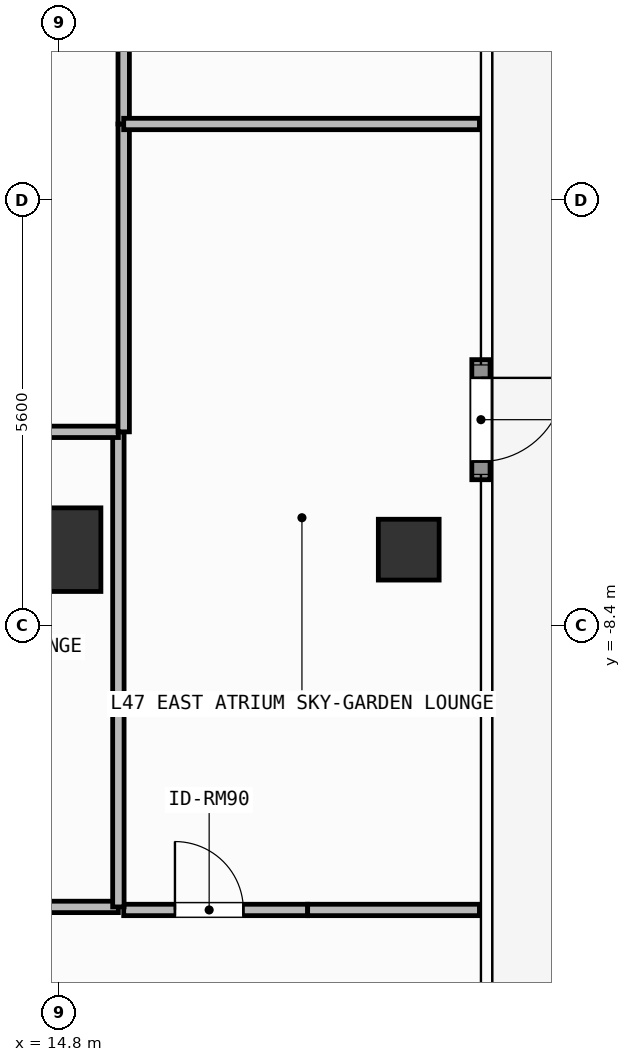
"""IFC4 building model, lengths in metres.
Left out: names, types, materials, properties, quantities, classifications, styles, units other than length and angle.
Written with IfcOpenShell. Run it as: python <this file> out.ifc"""

import sys

from ifc_helpers import new_model, si_unit, direction, frame, frame_2d, origin, origin_2d, place, context, subcontext, project, spatial, rectangle, hollow_rectangle, extrude, element, fill, save


model = new_model("IFC4")
c1 = context("Model", 3, precision=1e-05, world=origin(), true_north=direction((0.0, 1.0)))
c2 = subcontext(c1, "Body", "Model", "MODEL_VIEW")
j1 = project(units=[si_unit("LENGTHUNIT", "METRE"), si_unit("PLANEANGLEUNIT", "RADIAN")], contexts=[c1])
p1 = place(None, origin())
s1 = spatial("IfcSite", under=j1, at=p1, CompositionType="ELEMENT")
p2 = place(p1, origin())
s2 = spatial("IfcBuilding", under=s1, at=p2, CompositionType="ELEMENT")
p3 = place(p2, frame((0.0, 0.0, 191.4)))
s3 = spatial("IfcBuildingStorey", under=s2, at=p3, CompositionType="ELEMENT", Elevation=191.4)
p4 = place(p3, frame((14.8, -7.4, 0.0), z_axis=(0.0, 0.0, 1.0), x_axis=(1.0, 0.0, 0.0)))
e1 = element("IfcColumn", 1, at=p4, inside=s3, PredefinedType="COLUMN", context=c2, shape_type="SweptSolid", body=[
    extrude(rectangle(XDim=1.1, YDim=1.1, at=origin_2d()), origin(), (0.0, 0.0, 1.0), 3.9),
])
p5 = place(p3, frame((19.4, -7.4, 0.0), z_axis=(0.0, 0.0, 1.0), x_axis=(1.0, 0.0, 0.0)))
e2 = element("IfcColumn", 2, at=p5, inside=s3, PredefinedType="COLUMN", context=c2, shape_type="SweptSolid", body=[
    extrude(hollow_rectangle(XDim=0.8, YDim=0.8, WallThickness=0.036, at=origin_2d()), origin(), (0.0, 0.0, 1.0), 3.9),
])
p6 = place(p3, frame((20.35, -4.9, 0.0), z_axis=(0.0, 0.0, 1.0), x_axis=(0.0, -1.0, 0.0)))
e3 = element("IfcWall", 3, at=p6, inside=s3, PredefinedType="SOLIDWALL", context=c2, shape_type="SweptSolid", body=[
    extrude(rectangle(XDim=1.58, YDim=0.24, at=frame_2d((0.79, 0.0))), origin(), (0.0, 0.0, 1.0), 3.68),
])
p7 = place(p6, frame((0.24, 0.0, 0.0)))
e4 = element("IfcOpeningElement", 4, at=p7, cuts=e3, PredefinedType="OPENING", context=c2, shape_type="SweptSolid", body=[
    extrude(rectangle(XDim=1.1, YDim=2.2, at=frame_2d((0.55, 1.1))), frame((0.0, 0.13, 0.0), z_axis=(0.0, -1.0, 0.0), x_axis=(1.0, 0.0, 0.0)), (0.0, 0.0, 1.0), 0.26),
])
p8 = place(p3, frame((10.1, -12.1, 0.0), z_axis=(0.0, 0.0, 1.0), x_axis=(1.0, 0.0, 0.0)))
e5 = element("IfcWall", 5, at=p8, inside=s3, PredefinedType="PARTITIONING", context=c2, shape_type="SweptSolid", body=[
    extrude(rectangle(XDim=5.48, YDim=0.15, at=frame_2d((2.74, 0.0))), origin(), (0.0, 0.0, 1.0), 3.68),
])
p9 = place(p8, frame((2.29, 0.0, 0.0)))
e6 = element("IfcOpeningElement", 6, at=p9, cuts=e5, PredefinedType="OPENING", context=c2, shape_type="SweptSolid", body=[
    extrude(rectangle(XDim=0.9, YDim=2.1, at=frame_2d((0.45, 1.05))), frame((0.0, 0.085, 0.0), z_axis=(0.0, -1.0, 0.0), x_axis=(1.0, 0.0, 0.0)), (0.0, 0.0, 1.0), 0.17),
])
p10 = place(p3, frame((15.65, -12.14, 0.0), z_axis=(0.0, 0.0, 1.0), x_axis=(1.0, 0.0, 0.0)))
e7 = element("IfcWall", 7, at=p10, inside=s3, PredefinedType="PARTITIONING", context=c2, shape_type="SweptSolid", body=[
    extrude(rectangle(XDim=2.42, YDim=0.15, at=frame_2d((1.21, 0.0))), origin(), (0.0, 0.0, 1.0), 3.68),
])
p11 = place(p10, frame((0.674, 0.0, 0.0)))
e8 = element("IfcOpeningElement", 8, at=p11, cuts=e7, PredefinedType="OPENING", context=c2, shape_type="SweptSolid", body=[
    extrude(rectangle(XDim=0.9, YDim=2.1, at=frame_2d((0.45, 1.05))), frame((0.0, 0.085, 0.0), z_axis=(0.0, -1.0, 0.0), x_axis=(1.0, 0.0, 0.0)), (0.0, 0.0, 1.0), 0.17),
])
p12 = place(p3, frame((15.58, -12.1, 0.0), z_axis=(0.0, 0.0, 1.0), x_axis=(0.0, 1.0, 0.0)))
e9 = element("IfcWall", 9, at=p12, inside=s3, PredefinedType="PARTITIONING", context=c2, shape_type="SweptSolid", body=[
    extrude(rectangle(XDim=6.25, YDim=0.15, at=frame_2d((3.125, 0.0))), origin(), (0.0, 0.0, 1.0), 3.68),
])
p13 = place(p3, frame((8.96, -5.85, 0.0), z_axis=(0.0, 0.0, 1.0), x_axis=(1.0, 0.0, 0.0)))
e10 = element("IfcWall", 10, at=p13, inside=s3, PredefinedType="PARTITIONING", context=c2, shape_type="SweptSolid", body=[
    extrude(rectangle(XDim=6.62, YDim=0.15, at=frame_2d((3.31, 0.0))), origin(), (0.0, 0.0, 1.0), 3.68),
])
p14 = place(p3, frame((15.65, -5.85, 0.0), z_axis=(0.0, 0.0, 1.0), x_axis=(0.0, 1.0, 0.0)))
e11 = element("IfcWall", 11, at=p14, inside=s3, PredefinedType="PARTITIONING", context=c2, shape_type="SweptSolid", body=[
    extrude(rectangle(XDim=4.05, YDim=0.15, at=frame_2d((2.025, 0.0))), origin(), (0.0, 0.0, 1.0), 3.68),
])
p15 = place(p3, frame((15.65, -1.8, 0.0), z_axis=(0.0, 0.0, 1.0), x_axis=(0.0, 1.0, 0.0)))
e12 = element("IfcWall", 12, at=p15, inside=s3, PredefinedType="PARTITIONING", context=c2, shape_type="SweptSolid", body=[
    extrude(rectangle(XDim=7.65, YDim=0.15, at=frame_2d((3.825, 0.0))), origin(), (0.0, 0.0, 1.0), 3.68),
])
p16 = place(p3, frame((15.65, -1.8, 0.0), z_axis=(0.0, 0.0, 1.0), x_axis=(1.0, 0.0, 0.0)))
e13 = element("IfcWall", 13, at=p16, inside=s3, PredefinedType="PARTITIONING", context=c2, shape_type="SweptSolid", body=[
    extrude(rectangle(XDim=4.68, YDim=0.15, at=frame_2d((2.34, 0.0))), origin(), (0.0, 0.0, 1.0), 3.68),
])
p17 = place(p3, frame((18.07, -12.14, 0.0), z_axis=(0.0, 0.0, 1.0), x_axis=(1.0, 0.0, 0.0)))
e14 = element("IfcWall", 14, at=p17, inside=s3, PredefinedType="PARTITIONING", context=c2, shape_type="SweptSolid", body=[
    extrude(rectangle(XDim=2.26, YDim=0.15, at=frame_2d((1.13, 0.0))), origin(), (0.0, 0.0, 1.0), 3.68),
])
p18 = place(p7, origin())
e15 = element("IfcDoor", 15, at=p18, inside=s3, OperationType="SINGLE_SWING_LEFT", PredefinedType="DOOR", context=c2, shape_type="SweptSolid", body=[
    extrude(rectangle(XDim=1.1, YDim=2.2, at=frame_2d((0.55, 1.1))), frame((0.0, 0.025, 0.0), z_axis=(0.0, -1.0, 0.0), x_axis=(1.0, 0.0, 0.0)), (0.0, 0.0, 1.0), 0.05),
])
fill(e4, e15)
p19 = place(p11, origin())
e16 = element("IfcDoor", 16, at=p19, inside=s3, OperationType="SINGLE_SWING_LEFT", PredefinedType="DOOR", context=c2, shape_type="SweptSolid", body=[
    extrude(rectangle(XDim=0.9, YDim=2.1, at=frame_2d((0.45, 1.05))), frame((0.0, 0.025, 0.0), z_axis=(0.0, -1.0, 0.0), x_axis=(1.0, 0.0, 0.0)), (0.0, 0.0, 1.0), 0.05),
])
fill(e8, e16)
save(model, sys.argv[1])
